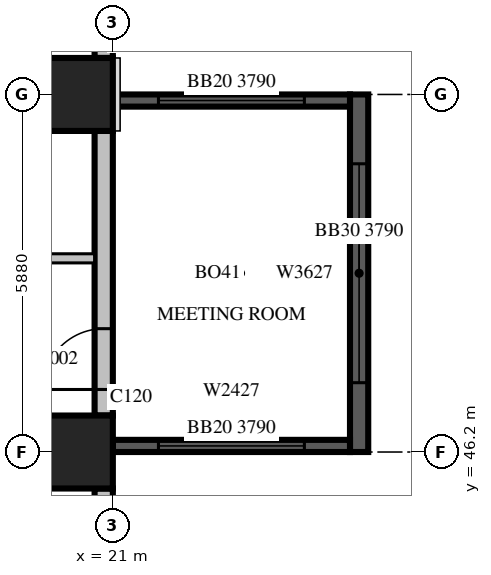
"""IFC4 building model, lengths in metres.
Left out: names, types, materials, properties, quantities, classifications, styles, units other than length and angle.
Written with IfcOpenShell. Run it as: python <this file> out.ifc"""

import sys

from ifc_helpers import new_model, si_unit, direction, frame, frame_2d, origin, origin_2d, place, context, subcontext, project, spatial, rectangle, extrude, source, transform, mapped, element, fill, save


model = new_model("IFC4")
c1 = context("Model", 3, precision=1e-05, world=origin(), true_north=direction((0.0, 1.0)))
c2 = subcontext(c1, "Body", "Model", "MODEL_VIEW")
j1 = project(units=[si_unit("LENGTHUNIT", "METRE"), si_unit("PLANEANGLEUNIT", "RADIAN")], contexts=[c1])
p1 = place(None, origin())
s1 = spatial("IfcSite", under=j1, at=p1, CompositionType="ELEMENT")
p2 = place(p1, origin())
s2 = spatial("IfcBuilding", under=s1, at=p2, CompositionType="ELEMENT")
p3 = place(p2, frame((0.0, 0.0, 86.7)))
s3 = spatial("IfcBuildingStorey", under=s2, at=p3, CompositionType="ELEMENT", Elevation=86.7)
m1 = source(origin(), c2, "Body", "SweptSolid", [
    extrude(rectangle(XDim=1.2, YDim=1.2, at=origin_2d()), origin(), (0.0, 0.0, 1.0), 4.2),
])
for number, where, z_axis, x_axis in (
    (1, (20.4, 46.2, 0.0), (0.0, 0.0, 1.0), (1.0, 0.0, 0.0)),
    (2, (20.4, 52.08, 0.0), (0.0, 0.0, 1.0), (1.0, 0.0, 0.0)),
):
    element("IfcColumn", number, at=place(p3, frame(where, z_axis=z_axis, x_axis=x_axis)), inside=s3, PredefinedType="COLUMN", context=c2, shape_type="MappedRepresentation", body=[
        mapped(m1, transform((0.0, 0.0, 0.0), scale=1.0)),
    ])
m2 = source(origin(), c2, "Body", "SweptSolid", [
    extrude(rectangle(XDim=7.2, YDim=0.3, at=frame_2d((3.6, 0.0))), origin(), (0.0, 0.0, 1.0), 3.8),
])
p4 = place(p3, frame((20.85, 38.4, 0.0), z_axis=(0.0, 0.0, 1.0), x_axis=(0.0, 1.0, 0.0)))
e3 = element("IfcWall", 3, at=p4, inside=s3, PredefinedType="STANDARD", context=c2, shape_type="MappedRepresentation", body=[
    mapped(m2, transform((0.0, 0.0, 0.0), scale=1.0)),
])
m3 = source(origin(), c2, "Body", "SweptSolid", [
    extrude(rectangle(XDim=2.4, YDim=2.7, at=frame_2d((1.2, 1.35))), frame((0.0, 0.16, 0.0), z_axis=(0.0, -1.0, 0.0), x_axis=(1.0, 0.0, 0.0)), (0.0, 0.0, 1.0), 0.32),
])
p5 = place(p4, frame((0.3, 0.0, 0.6)))
e4 = element("IfcOpeningElement", 4, at=p5, cuts=e3, PredefinedType="OPENING", context=c2, shape_type="MappedRepresentation", body=[
    mapped(m3, transform((0.0, 0.0, 0.0), scale=1.0)),
])
m4 = source(origin(), c2, "Body", "SweptSolid", [
    extrude(rectangle(XDim=4.68, YDim=0.3, at=frame_2d((2.34, 0.0))), origin(), (0.0, 0.0, 1.0), 3.8),
])
p6 = place(p3, frame((20.85, 46.8, 0.0), z_axis=(0.0, 0.0, 1.0), x_axis=(0.0, 1.0, 0.0)))
e5 = element("IfcWall", 5, at=p6, inside=s3, PredefinedType="STANDARD", context=c2, shape_type="MappedRepresentation", body=[
    mapped(m4, transform((0.0, 0.0, 0.0), scale=1.0)),
])
m5 = source(origin(), c2, "Body", "SweptSolid", [
    extrude(rectangle(XDim=1.0, YDim=2.1, at=frame_2d((0.5, 1.05))), frame((0.0, 0.16, 0.0), z_axis=(0.0, -1.0, 0.0), x_axis=(1.0, 0.0, 0.0)), (0.0, 0.0, 1.0), 0.32),
])
p7 = place(p6, frame((0.428, 0.0, 0.0)))
e6 = element("IfcOpeningElement", 6, at=p7, cuts=e5, PredefinedType="OPENING", context=c2, shape_type="MappedRepresentation", body=[
    mapped(m5, transform((0.0, 0.0, 0.0), scale=1.0)),
])
m6 = source(origin(), c2, "Body", "SweptSolid", [
    extrude(rectangle(XDim=0.88, YDim=0.3, at=frame_2d((0.44, 0.0))), origin(), (0.0, 0.0, 1.0), 3.8),
])
p8 = place(p3, frame((20.85, 52.68, 0.0), z_axis=(0.0, 0.0, 1.0), x_axis=(0.0, 1.0, 0.0)))
e7 = element("IfcWall", 7, at=p8, inside=s3, PredefinedType="STANDARD", context=c2, shape_type="MappedRepresentation", body=[
    mapped(m6, transform((0.0, 0.0, 0.0), scale=1.0)),
])
m7 = source(origin(), c2, "Body", "SweptSolid", [
    extrude(rectangle(XDim=5.88, YDim=0.3, at=frame_2d((2.94, 0.0))), origin(), (0.0, 0.0, 1.0), 3.79),
])
p9 = place(p3, frame((25.05, 46.2, 0.0), z_axis=(0.0, 0.0, 1.0), x_axis=(0.0, 1.0, 0.0)))
e8 = element("IfcWall", 8, at=p9, inside=s3, PredefinedType="SOLIDWALL", context=c2, shape_type="MappedRepresentation", body=[
    mapped(m7, transform((0.0, 0.0, 0.0), scale=1.0)),
])
m8 = source(origin(), c2, "Body", "SweptSolid", [
    extrude(rectangle(XDim=3.6, YDim=2.7, at=frame_2d((1.8, 1.35))), frame((0.0, 0.16, 0.0), z_axis=(0.0, -1.0, 0.0), x_axis=(1.0, 0.0, 0.0)), (0.0, 0.0, 1.0), 0.32),
])
p10 = place(p9, frame((1.14, 0.0, 0.6)))
e9 = element("IfcOpeningElement", 9, at=p10, cuts=e8, PredefinedType="OPENING", context=c2, shape_type="MappedRepresentation", body=[
    mapped(m8, transform((0.0, 0.0, 0.0), scale=1.0)),
])
m9 = source(origin(), c2, "Body", "SweptSolid", [
    extrude(rectangle(XDim=3.9, YDim=0.2, at=frame_2d((1.95, 0.0))), origin(), (0.0, 0.0, 1.0), 3.79),
])
p11 = place(p3, frame((21.0, 46.3, 0.0), z_axis=(0.0, 0.0, 1.0), x_axis=(1.0, 0.0, 0.0)))
e10 = element("IfcWall", 10, at=p11, inside=s3, PredefinedType="SOLIDWALL", context=c2, shape_type="MappedRepresentation", body=[
    mapped(m9, transform((0.0, 0.0, 0.0), scale=1.0)),
])
m10 = source(origin(), c2, "Body", "SweptSolid", [
    extrude(rectangle(XDim=2.4, YDim=2.7, at=frame_2d((1.2, 1.35))), frame((0.0, 0.11, 0.0), z_axis=(0.0, -1.0, 0.0), x_axis=(1.0, 0.0, 0.0)), (0.0, 0.0, 1.0), 0.22),
])
p12 = place(p11, frame((0.75, 0.0, 0.6)))
e11 = element("IfcOpeningElement", 11, at=p12, cuts=e10, PredefinedType="OPENING", context=c2, shape_type="MappedRepresentation", body=[
    mapped(m10, transform((0.0, 0.0, 0.0), scale=1.0)),
])
p13 = place(p3, frame((21.0, 51.98, 0.0), z_axis=(0.0, 0.0, 1.0), x_axis=(1.0, 0.0, 0.0)))
e12 = element("IfcWall", 12, at=p13, inside=s3, PredefinedType="SOLIDWALL", context=c2, shape_type="MappedRepresentation", body=[
    mapped(m9, transform((0.0, 0.0, 0.0), scale=1.0)),
])
p14 = place(p13, frame((0.75, 0.0, 0.6)))
e13 = element("IfcOpeningElement", 13, at=p14, cuts=e12, PredefinedType="OPENING", context=c2, shape_type="MappedRepresentation", body=[
    mapped(m10, transform((0.0, 0.0, 0.0), scale=1.0)),
])
m11 = source(origin(), c2, "Body", "SweptSolid", [
    extrude(rectangle(XDim=3.6, YDim=0.15, at=frame_2d((1.8, 0.0))), origin(), (0.0, 0.0, 1.0), 3.8),
])
p15 = place(p3, frame((17.1, 49.385, 0.0), z_axis=(0.0, 0.0, 1.0), x_axis=(1.0, 0.0, 0.0)))
e14 = element("IfcWall", 14, at=p15, inside=s3, PredefinedType="PARTITIONING", context=c2, shape_type="MappedRepresentation", body=[
    mapped(m11, transform((0.0, 0.0, 0.0), scale=1.0)),
])
m12 = source(origin(), c2, "Body", "SweptSolid", [
    extrude(rectangle(XDim=3.6, YDim=2.7, at=frame_2d((1.8, 1.35))), frame((0.0, 0.03, 0.0), z_axis=(0.0, -1.0, 0.0), x_axis=(1.0, 0.0, 0.0)), (0.0, 0.0, 1.0), 0.06),
])
p16 = place(p10, origin())
e15 = element("IfcWindow", 15, at=p16, inside=s3, PartitioningType="SINGLE_PANEL", PredefinedType="WINDOW", context=c2, shape_type="MappedRepresentation", body=[
    mapped(m12, transform((0.0, 0.0, 0.0), scale=1.0)),
])
fill(e9, e15)
m13 = source(origin(), c2, "Body", "SweptSolid", [
    extrude(rectangle(XDim=2.4, YDim=2.7, at=frame_2d((1.2, 1.35))), frame((0.0, 0.03, 0.0), z_axis=(0.0, -1.0, 0.0), x_axis=(1.0, 0.0, 0.0)), (0.0, 0.0, 1.0), 0.06),
])
p17 = place(p12, origin())
e16 = element("IfcWindow", 16, at=p17, inside=s3, PartitioningType="SINGLE_PANEL", PredefinedType="WINDOW", context=c2, shape_type="MappedRepresentation", body=[
    mapped(m13, transform((0.0, 0.0, 0.0), scale=1.0)),
])
fill(e11, e16)
p18 = place(p14, origin())
e17 = element("IfcWindow", 17, at=p18, inside=s3, PartitioningType="SINGLE_PANEL", PredefinedType="WINDOW", context=c2, shape_type="MappedRepresentation", body=[
    mapped(m13, transform((0.0, 0.0, 0.0), scale=1.0)),
])
fill(e13, e17)
m14 = source(origin(), c2, "Body", "SweptSolid", [
    extrude(rectangle(XDim=1.0, YDim=2.1, at=frame_2d((0.5, 1.05))), frame((0.0, 0.025, 0.0), z_axis=(0.0, -1.0, 0.0), x_axis=(1.0, 0.0, 0.0)), (0.0, 0.0, 1.0), 0.05),
])
p19 = place(p7, origin())
e18 = element("IfcDoor", 18, at=p19, inside=s3, OperationType="SINGLE_SWING_LEFT", PredefinedType="DOOR", context=c2, shape_type="MappedRepresentation", body=[
    mapped(m14, transform((0.0, 0.0, 0.0), scale=1.0)),
])
fill(e6, e18)
save(model, sys.argv[1])
